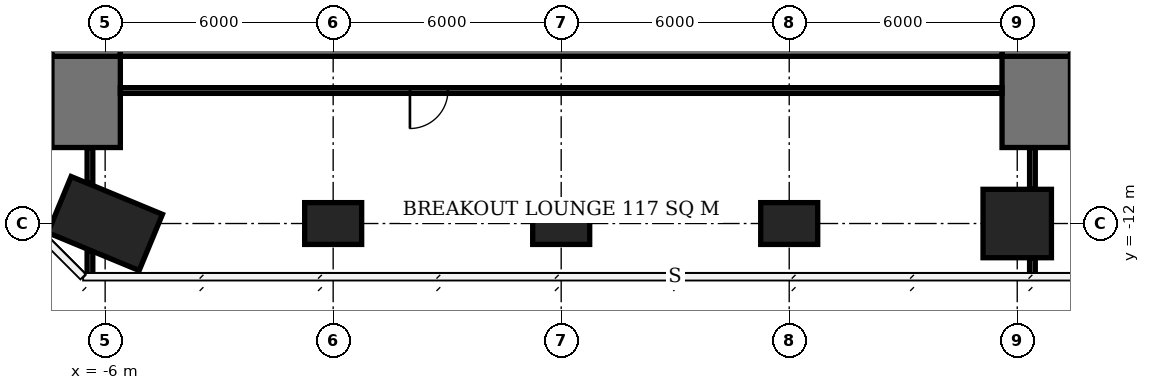
"""IFC4 building model, lengths in metres.
Left out: names, types, materials, properties, quantities, classifications, styles, units other than length and angle.
Written with IfcOpenShell. Run it as: python <this file> out.ifc"""

import sys

from ifc_helpers import new_model, si_unit, direction, frame, frame_2d, origin, origin_2d, place, context, subcontext, project, spatial, rectangle, extrude, element, fill, save


model = new_model("IFC4")
c1 = context("Model", 3, precision=1e-05, world=origin(), true_north=direction((0.0, 1.0)))
c2 = subcontext(c1, "Body", "Model", "MODEL_VIEW")
j1 = project(units=[si_unit("LENGTHUNIT", "METRE"), si_unit("PLANEANGLEUNIT", "RADIAN")], contexts=[c1])
p1 = place(None, origin())
s1 = spatial("IfcSite", under=j1, at=p1, CompositionType="ELEMENT")
p2 = place(p1, origin())
s2 = spatial("IfcBuilding", under=s1, at=p2, CompositionType="ELEMENT")
p3 = place(p2, frame((0.0, 0.0, 181.1)))
s3 = spatial("IfcBuildingStorey", under=s2, at=p3, CompositionType="ELEMENT", Elevation=181.1)
p4 = place(p3, frame((-6.0, -12.0, 0.0), z_axis=(0.0, 0.0, 1.0), x_axis=(-0.923879532511, 0.382683432365, 0.0)))
e1 = element("IfcColumn", 1, at=p4, inside=s3, PredefinedType="COLUMN", context=c2, shape_type="SweptSolid", body=[
    extrude(rectangle(XDim=2.6, YDim=1.6, at=origin_2d()), origin(), (0.0, 0.0, 1.0), 3.9),
])
for number, where, z_axis, x_axis in (
    (2, (0.0, -12.0, 0.0), (0.0, 0.0, 1.0), (1.0, 0.0, 0.0)),
    (3, (6.0, -12.0, 0.0), (0.0, 0.0, 1.0), (1.0, 0.0, 0.0)),
    (4, (12.0, -12.0, 0.0), (0.0, 0.0, 1.0), (1.0, 0.0, 0.0)),
):
    element("IfcColumn", number, at=place(p3, frame(where, z_axis=z_axis, x_axis=x_axis)), inside=s3, PredefinedType="COLUMN", context=c2, shape_type="SweptSolid", body=[
        extrude(rectangle(XDim=1.5, YDim=1.1, at=origin_2d()), origin(), (0.0, 0.0, 1.0), 3.9),
    ])
p5 = place(p3, frame((18.0, -12.0, 0.0), z_axis=(0.0, 0.0, 1.0), x_axis=(1.0, 0.0, 0.0)))
e5 = element("IfcColumn", 5, at=p5, inside=s3, PredefinedType="COLUMN", context=c2, shape_type="SweptSolid", body=[
    extrude(rectangle(XDim=1.8, YDim=1.8, at=origin_2d()), origin(), (0.0, 0.0, 1.0), 3.9),
])
p6 = place(p3, frame((-5.6, -6.6, 0.0), z_axis=(0.0, 0.0, 1.0), x_axis=(1.0, 0.0, 0.0)))
e6 = element("IfcWall", 6, at=p6, inside=s3, PredefinedType="SHEAR", context=c2, shape_type="SweptSolid", body=[
    extrude(rectangle(XDim=23.2, YDim=2.0, at=frame_2d((11.6, 0.0))), origin(), (0.0, 0.0, 1.0), 3.9),
])
p7 = place(p3, frame((-6.5, -7.6, 0.0), z_axis=(0.0, 0.0, 1.0), x_axis=(0.0, 1.0, 0.0)))
e7 = element("IfcWall", 7, at=p7, inside=s3, PredefinedType="SHEAR", context=c2, shape_type="SweptSolid", body=[
    extrude(rectangle(XDim=21.2, YDim=1.8, at=frame_2d((10.6, 0.0))), origin(), (0.0, 0.0, 1.0), 3.9),
])
p8 = place(p7, frame((7.8, 0.0, 0.0)))
e8 = element("IfcOpeningElement", 8, at=p8, cuts=e7, PredefinedType="OPENING", context=c2, shape_type="SweptSolid", body=[
    extrude(rectangle(XDim=1.8, YDim=2.4, at=frame_2d((0.9, 1.2))), frame((0.0, 0.91, 0.0), z_axis=(0.0, -1.0, 0.0), x_axis=(1.0, 0.0, 0.0)), (0.0, 0.0, 1.0), 1.82),
])
p9 = place(p3, frame((18.5, -7.6, 0.0), z_axis=(0.0, 0.0, 1.0), x_axis=(0.0, 1.0, 0.0)))
e9 = element("IfcWall", 9, at=p9, inside=s3, PredefinedType="SHEAR", context=c2, shape_type="SweptSolid", body=[
    extrude(rectangle(XDim=21.2, YDim=1.8, at=frame_2d((10.6, 0.0))), origin(), (0.0, 0.0, 1.0), 3.9),
])
p10 = place(p9, frame((9.2, 0.0, 0.0)))
e10 = element("IfcOpeningElement", 10, at=p10, cuts=e9, PredefinedType="OPENING", context=c2, shape_type="SweptSolid", body=[
    extrude(rectangle(XDim=1.8, YDim=2.4, at=frame_2d((0.9, 1.2))), frame((0.0, 0.91, 0.0), z_axis=(0.0, -1.0, 0.0), x_axis=(1.0, 0.0, 0.0)), (0.0, 0.0, 1.0), 1.82),
])
for number, where, z_axis, x_axis in (
    (11, (-6.5, -10.0, 0.0), (0.0, 0.0, 1.0), (0.0, 1.0, 0.0)),
    (12, (18.5, -10.0, 0.0), (0.0, 0.0, 1.0), (0.0, 1.0, 0.0)),
):
    element("IfcWall", number, at=place(p3, frame(where, z_axis=z_axis, x_axis=x_axis)), inside=s3, PredefinedType="SHEAR", context=c2, shape_type="SweptSolid", body=[
        extrude(rectangle(XDim=2.4, YDim=1.8, at=frame_2d((1.2, 0.0))), origin(), (0.0, 0.0, 1.0), 3.9),
    ])
p11 = place(p3, frame((-6.4, -13.4, 0.0), z_axis=(0.0, 0.0, 1.0), x_axis=(0.0, 1.0, 0.0)))
e13 = element("IfcWall", 13, at=p11, inside=s3, PredefinedType="PARTITIONING", context=c2, shape_type="SweptSolid", body=[
    extrude(rectangle(XDim=0.669, YDim=0.15, at=frame_2d((0.334, 0.0))), origin(), (0.0, 0.0, 1.0), 3.65),
])
p12 = place(p3, frame((-6.4, -10.937, 0.0), z_axis=(0.0, 0.0, 1.0), x_axis=(0.0, 1.0, 0.0)))
e14 = element("IfcWall", 14, at=p12, inside=s3, PredefinedType="PARTITIONING", context=c2, shape_type="SweptSolid", body=[
    extrude(rectangle(XDim=0.937, YDim=0.15, at=frame_2d((0.469, 0.0))), origin(), (0.0, 0.0, 1.0), 3.65),
])
p13 = place(p3, frame((17.6, -8.5, 0.0), z_axis=(0.0, 0.0, 1.0), x_axis=(-1.0, 0.0, 0.0)))
e15 = element("IfcWall", 15, at=p13, inside=s3, PredefinedType="PARTITIONING", context=c2, shape_type="SweptSolid", body=[
    extrude(rectangle(XDim=23.2, YDim=0.15, at=frame_2d((11.6, 0.0))), origin(), (0.0, 0.0, 1.0), 3.65),
])
p14 = place(p13, frame((14.58, 0.0, 0.0)))
e16 = element("IfcOpeningElement", 16, at=p14, cuts=e15, PredefinedType="OPENING", context=c2, shape_type="SweptSolid", body=[
    extrude(rectangle(XDim=1.0, YDim=2.1, at=frame_2d((0.5, 1.05))), frame((0.0, 0.085, 0.0), z_axis=(0.0, -1.0, 0.0), x_axis=(1.0, 0.0, 0.0)), (0.0, 0.0, 1.0), 0.17),
])
p15 = place(p3, frame((18.4, -13.35, 0.0), z_axis=(0.0, 0.0, 1.0), x_axis=(0.0, 1.0, 0.0)))
e17 = element("IfcWall", 17, at=p15, inside=s3, PredefinedType="PARTITIONING", context=c2, shape_type="SweptSolid", body=[
    extrude(rectangle(XDim=0.45, YDim=0.15, at=frame_2d((0.225, 0.0))), origin(), (0.0, 0.0, 1.0), 3.65),
])
p16 = place(p3, frame((18.4, -11.1, 0.0), z_axis=(0.0, 0.0, 1.0), x_axis=(0.0, 1.0, 0.0)))
e18 = element("IfcWall", 18, at=p16, inside=s3, PredefinedType="PARTITIONING", context=c2, shape_type="SweptSolid", body=[
    extrude(rectangle(XDim=1.1, YDim=0.15, at=frame_2d((0.55, 0.0))), origin(), (0.0, 0.0, 1.0), 3.65),
])
p17 = place(p14, origin())
e19 = element("IfcDoor", 19, at=p17, inside=s3, OperationType="SINGLE_SWING_RIGHT", PredefinedType="DOOR", context=c2, shape_type="SweptSolid", body=[
    extrude(rectangle(XDim=1.0, YDim=2.1, at=frame_2d((0.5, 1.05))), frame((0.0, 0.025, 0.0), z_axis=(0.0, -1.0, 0.0), x_axis=(1.0, 0.0, 0.0)), (0.0, 0.0, 1.0), 0.05),
])
fill(e16, e19)
save(model, sys.argv[1])
